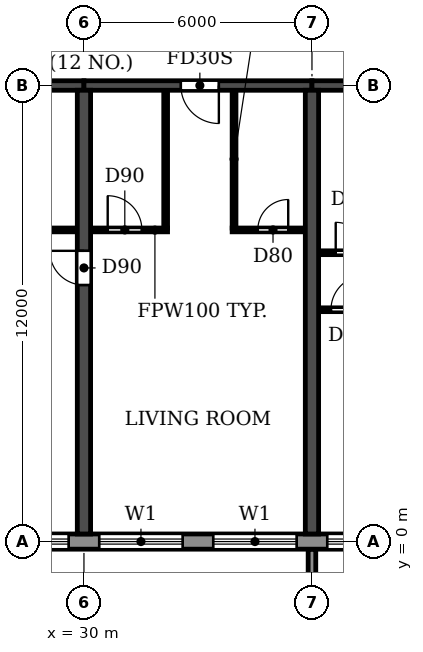
"""IFC4 building model, lengths in metres.
Left out: names, types, materials, properties, quantities, classifications, styles, units other than length and angle.
Written with IfcOpenShell. Run it as: python <this file> out.ifc"""

import sys

from ifc_helpers import new_model, si_unit, direction, frame, frame_2d, origin, place, context, subcontext, project, spatial, polyline, rectangle, outline, extrude, source, transform, mapped, element, fill, save


model = new_model("IFC4")
c1 = context("Model", 3, precision=1e-05, world=origin(), true_north=direction((0.0, 1.0)))
c2 = subcontext(c1, "Body", "Model", "MODEL_VIEW")
j1 = project(units=[si_unit("LENGTHUNIT", "METRE"), si_unit("PLANEANGLEUNIT", "RADIAN")], contexts=[c1])
p1 = place(None, origin())
s1 = spatial("IfcSite", under=j1, at=p1, CompositionType="ELEMENT")
p2 = place(p1, origin())
s2 = spatial("IfcBuilding", under=s1, at=p2, CompositionType="ELEMENT")
p3 = place(p2, frame((0.0, 0.0, 92.7)))
s3 = spatial("IfcBuildingStorey", under=s2, at=p3, CompositionType="ELEMENT", Elevation=92.7)
p4 = place(p3, frame((30.0, 0.2, 0.0), z_axis=(0.0, 0.0, 1.0), x_axis=(0.0, 1.0, 0.0)))
e1 = element("IfcWall", 1, at=p4, inside=s3, PredefinedType="SHEAR", context=c2, shape_type="SweptSolid", body=[
    extrude(rectangle(XDim=11.675, YDim=0.35, at=frame_2d((5.837, 0.0))), origin(), (0.0, 0.0, 1.0), 3.06),
])
p5 = place(p4, frame((6.55, 0.0, 0.0)))
e2 = element("IfcOpeningElement", 2, at=p5, cuts=e1, PredefinedType="OPENING", context=c2, shape_type="SweptSolid", body=[
    extrude(rectangle(XDim=0.9, YDim=2.1, at=frame_2d((0.45, 1.05))), frame((0.0, 0.185, 0.0), z_axis=(0.0, -1.0, 0.0), x_axis=(1.0, 0.0, 0.0)), (0.0, 0.0, 1.0), 0.37),
])
p6 = place(p3, frame((36.0, 0.2, 0.0), z_axis=(0.0, 0.0, 1.0), x_axis=(0.0, 1.0, 0.0)))
e3 = element("IfcWall", 3, at=p6, inside=s3, PredefinedType="SHEAR", context=c2, shape_type="SweptSolid", body=[
    extrude(rectangle(XDim=11.675, YDim=0.35, at=frame_2d((5.837, 0.0))), origin(), (0.0, 0.0, 1.0), 3.06),
])
p7 = place(p3, frame((24.0, 12.0, 0.0), z_axis=(0.0, 0.0, 1.0), x_axis=(1.0, 0.0, 0.0)))
e4 = element("IfcWall", 4, at=p7, inside=s3, PredefinedType="SHEAR", context=c2, shape_type="SweptSolid", body=[
    extrude(rectangle(XDim=6.0, YDim=0.25, at=frame_2d((3.0, 0.0))), origin(), (0.0, 0.0, 1.0), 2.46),
])
p8 = place(p3, frame((30.0, 12.0, 0.0), z_axis=(0.0, 0.0, 1.0), x_axis=(1.0, 0.0, 0.0)))
e5 = element("IfcWall", 5, at=p8, inside=s3, PredefinedType="SHEAR", context=c2, shape_type="SweptSolid", body=[
    extrude(rectangle(XDim=6.0, YDim=0.25, at=frame_2d((3.0, 0.0))), origin(), (0.0, 0.0, 1.0), 2.46),
])
p9 = place(p8, frame((2.55, 0.0, 0.0)))
e6 = element("IfcOpeningElement", 6, at=p9, cuts=e5, PredefinedType="OPENING", context=c2, shape_type="SweptSolid", body=[
    extrude(rectangle(XDim=1.0, YDim=2.1, at=frame_2d((0.5, 1.05))), frame((0.0, 0.135, 0.0), z_axis=(0.0, -1.0, 0.0), x_axis=(1.0, 0.0, 0.0)), (0.0, 0.0, 1.0), 0.27),
])
p10 = place(p3, frame((36.0, 12.0, 0.0), z_axis=(0.0, 0.0, 1.0), x_axis=(1.0, 0.0, 0.0)))
e7 = element("IfcWall", 7, at=p10, inside=s3, PredefinedType="SHEAR", context=c2, shape_type="SweptSolid", body=[
    extrude(rectangle(XDim=6.0, YDim=0.25, at=frame_2d((3.0, 0.0))), origin(), (0.0, 0.0, 1.0), 2.46),
])
p11 = place(p10, frame((2.45, 0.0, 0.0)))
e8 = element("IfcOpeningElement", 8, at=p11, cuts=e7, PredefinedType="OPENING", context=c2, shape_type="SweptSolid", body=[
    extrude(rectangle(XDim=1.0, YDim=2.1, at=frame_2d((0.5, 1.05))), frame((0.0, 0.135, 0.0), z_axis=(0.0, -1.0, 0.0), x_axis=(1.0, 0.0, 0.0)), (0.0, 0.0, 1.0), 0.27),
])
p12 = place(p3, frame((10.683, 0.0, 0.0), z_axis=(0.0, 0.0, 1.0), x_axis=(1.0, 0.0, 0.0)))
e9 = element("IfcWall", 9, at=p12, inside=s3, PredefinedType="STANDARD", context=c2, shape_type="SweptSolid", body=[
    extrude(rectangle(XDim=80.634, YDim=0.4, at=frame_2d((40.317, 0.0))), origin(), (0.0, 0.0, 1.0), 3.06),
])
p13 = place(p12, frame((1.717, 0.0, 0.9)))
e10 = element("IfcOpeningElement", 10, at=p13, cuts=e9, PredefinedType="OPENING", context=c2, shape_type="SweptSolid", body=[
    extrude(rectangle(XDim=2.2, YDim=1.5, at=frame_2d((1.1, 0.75))), frame((0.0, 0.21, 0.0), z_axis=(0.0, -1.0, 0.0), x_axis=(1.0, 0.0, 0.0)), (0.0, 0.0, 1.0), 0.42),
])
p14 = place(p12, frame((4.917, 0.0, 0.0)))
e11 = element("IfcOpeningElement", 11, at=p14, cuts=e9, PredefinedType="OPENING", context=c2, shape_type="SweptSolid", body=[
    extrude(rectangle(XDim=1.8, YDim=2.4, at=frame_2d((0.9, 1.2))), frame((0.0, 0.21, 0.0), z_axis=(0.0, -1.0, 0.0), x_axis=(1.0, 0.0, 0.0)), (0.0, 0.0, 1.0), 0.42),
])
p15 = place(p12, frame((7.717, 0.0, 0.9)))
e12 = element("IfcOpeningElement", 12, at=p15, cuts=e9, PredefinedType="OPENING", context=c2, shape_type="SweptSolid", body=[
    extrude(rectangle(XDim=2.2, YDim=1.5, at=frame_2d((1.1, 0.75))), frame((0.0, 0.21, 0.0), z_axis=(0.0, -1.0, 0.0), x_axis=(1.0, 0.0, 0.0)), (0.0, 0.0, 1.0), 0.42),
])
p16 = place(p12, frame((10.717, 0.0, 0.9)))
e13 = element("IfcOpeningElement", 13, at=p16, cuts=e9, PredefinedType="OPENING", context=c2, shape_type="SweptSolid", body=[
    extrude(rectangle(XDim=2.2, YDim=1.5, at=frame_2d((1.1, 0.75))), frame((0.0, 0.21, 0.0), z_axis=(0.0, -1.0, 0.0), x_axis=(1.0, 0.0, 0.0)), (0.0, 0.0, 1.0), 0.42),
])
p17 = place(p12, frame((13.717, 0.0, 0.9)))
e14 = element("IfcOpeningElement", 14, at=p17, cuts=e9, PredefinedType="OPENING", context=c2, shape_type="SweptSolid", body=[
    extrude(rectangle(XDim=2.2, YDim=1.5, at=frame_2d((1.1, 0.75))), frame((0.0, 0.21, 0.0), z_axis=(0.0, -1.0, 0.0), x_axis=(1.0, 0.0, 0.0)), (0.0, 0.0, 1.0), 0.42),
])
p18 = place(p12, frame((16.717, 0.0, 0.9)))
e15 = element("IfcOpeningElement", 15, at=p18, cuts=e9, PredefinedType="OPENING", context=c2, shape_type="SweptSolid", body=[
    extrude(rectangle(XDim=2.2, YDim=1.5, at=frame_2d((1.1, 0.75))), frame((0.0, 0.21, 0.0), z_axis=(0.0, -1.0, 0.0), x_axis=(1.0, 0.0, 0.0)), (0.0, 0.0, 1.0), 0.42),
])
p19 = place(p12, frame((19.717, 0.0, 0.9)))
e16 = element("IfcOpeningElement", 16, at=p19, cuts=e9, PredefinedType="OPENING", context=c2, shape_type="SweptSolid", body=[
    extrude(rectangle(XDim=2.2, YDim=1.5, at=frame_2d((1.1, 0.75))), frame((0.0, 0.21, 0.0), z_axis=(0.0, -1.0, 0.0), x_axis=(1.0, 0.0, 0.0)), (0.0, 0.0, 1.0), 0.42),
])
p20 = place(p12, frame((22.717, 0.0, 0.9)))
e17 = element("IfcOpeningElement", 17, at=p20, cuts=e9, PredefinedType="OPENING", context=c2, shape_type="SweptSolid", body=[
    extrude(rectangle(XDim=2.2, YDim=1.5, at=frame_2d((1.1, 0.75))), frame((0.0, 0.21, 0.0), z_axis=(0.0, -1.0, 0.0), x_axis=(1.0, 0.0, 0.0)), (0.0, 0.0, 1.0), 0.42),
])
p21 = place(p12, frame((25.717, 0.0, 0.9)))
e18 = element("IfcOpeningElement", 18, at=p21, cuts=e9, PredefinedType="OPENING", context=c2, shape_type="SweptSolid", body=[
    extrude(rectangle(XDim=2.2, YDim=1.5, at=frame_2d((1.1, 0.75))), frame((0.0, 0.21, 0.0), z_axis=(0.0, -1.0, 0.0), x_axis=(1.0, 0.0, 0.0)), (0.0, 0.0, 1.0), 0.42),
])
p22 = place(p12, frame((28.917, 0.0, 0.0)))
e19 = element("IfcOpeningElement", 19, at=p22, cuts=e9, PredefinedType="OPENING", context=c2, shape_type="SweptSolid", body=[
    extrude(rectangle(XDim=1.8, YDim=2.4, at=frame_2d((0.9, 1.2))), frame((0.0, 0.21, 0.0), z_axis=(0.0, -1.0, 0.0), x_axis=(1.0, 0.0, 0.0)), (0.0, 0.0, 1.0), 0.42),
])
p23 = place(p12, frame((31.717, 0.0, 0.9)))
e20 = element("IfcOpeningElement", 20, at=p23, cuts=e9, PredefinedType="OPENING", context=c2, shape_type="SweptSolid", body=[
    extrude(rectangle(XDim=2.2, YDim=1.5, at=frame_2d((1.1, 0.75))), frame((0.0, 0.21, 0.0), z_axis=(0.0, -1.0, 0.0), x_axis=(1.0, 0.0, 0.0)), (0.0, 0.0, 1.0), 0.42),
])
p24 = place(p12, frame((34.717, 0.0, 0.9)))
e21 = element("IfcOpeningElement", 21, at=p24, cuts=e9, PredefinedType="OPENING", context=c2, shape_type="SweptSolid", body=[
    extrude(rectangle(XDim=2.2, YDim=1.5, at=frame_2d((1.1, 0.75))), frame((0.0, 0.21, 0.0), z_axis=(0.0, -1.0, 0.0), x_axis=(1.0, 0.0, 0.0)), (0.0, 0.0, 1.0), 0.42),
])
p25 = place(p12, frame((37.917, 0.0, 0.0)))
e22 = element("IfcOpeningElement", 22, at=p25, cuts=e9, PredefinedType="OPENING", context=c2, shape_type="SweptSolid", body=[
    extrude(rectangle(XDim=1.8, YDim=2.4, at=frame_2d((0.9, 1.2))), frame((0.0, 0.21, 0.0), z_axis=(0.0, -1.0, 0.0), x_axis=(1.0, 0.0, 0.0)), (0.0, 0.0, 1.0), 0.42),
])
p26 = place(p12, frame((40.717, 0.0, 0.9)))
e23 = element("IfcOpeningElement", 23, at=p26, cuts=e9, PredefinedType="OPENING", context=c2, shape_type="SweptSolid", body=[
    extrude(rectangle(XDim=2.2, YDim=1.5, at=frame_2d((1.1, 0.75))), frame((0.0, 0.21, 0.0), z_axis=(0.0, -1.0, 0.0), x_axis=(1.0, 0.0, 0.0)), (0.0, 0.0, 1.0), 0.42),
])
p27 = place(p12, frame((43.717, 0.0, 0.9)))
e24 = element("IfcOpeningElement", 24, at=p27, cuts=e9, PredefinedType="OPENING", context=c2, shape_type="SweptSolid", body=[
    extrude(rectangle(XDim=2.2, YDim=1.5, at=frame_2d((1.1, 0.75))), frame((0.0, 0.21, 0.0), z_axis=(0.0, -1.0, 0.0), x_axis=(1.0, 0.0, 0.0)), (0.0, 0.0, 1.0), 0.42),
])
p28 = place(p12, frame((46.717, 0.0, 0.9)))
e25 = element("IfcOpeningElement", 25, at=p28, cuts=e9, PredefinedType="OPENING", context=c2, shape_type="SweptSolid", body=[
    extrude(rectangle(XDim=2.2, YDim=1.5, at=frame_2d((1.1, 0.75))), frame((0.0, 0.21, 0.0), z_axis=(0.0, -1.0, 0.0), x_axis=(1.0, 0.0, 0.0)), (0.0, 0.0, 1.0), 0.42),
])
p29 = place(p12, frame((49.717, 0.0, 0.9)))
e26 = element("IfcOpeningElement", 26, at=p29, cuts=e9, PredefinedType="OPENING", context=c2, shape_type="SweptSolid", body=[
    extrude(rectangle(XDim=2.2, YDim=1.5, at=frame_2d((1.1, 0.75))), frame((0.0, 0.21, 0.0), z_axis=(0.0, -1.0, 0.0), x_axis=(1.0, 0.0, 0.0)), (0.0, 0.0, 1.0), 0.42),
])
p30 = place(p12, frame((52.917, 0.0, 0.0)))
e27 = element("IfcOpeningElement", 27, at=p30, cuts=e9, PredefinedType="OPENING", context=c2, shape_type="SweptSolid", body=[
    extrude(rectangle(XDim=1.8, YDim=2.4, at=frame_2d((0.9, 1.2))), frame((0.0, 0.21, 0.0), z_axis=(0.0, -1.0, 0.0), x_axis=(1.0, 0.0, 0.0)), (0.0, 0.0, 1.0), 0.42),
])
p31 = place(p12, frame((55.717, 0.0, 0.9)))
e28 = element("IfcOpeningElement", 28, at=p31, cuts=e9, PredefinedType="OPENING", context=c2, shape_type="SweptSolid", body=[
    extrude(rectangle(XDim=2.2, YDim=1.5, at=frame_2d((1.1, 0.75))), frame((0.0, 0.21, 0.0), z_axis=(0.0, -1.0, 0.0), x_axis=(1.0, 0.0, 0.0)), (0.0, 0.0, 1.0), 0.42),
])
p32 = place(p12, frame((58.717, 0.0, 0.9)))
e29 = element("IfcOpeningElement", 29, at=p32, cuts=e9, PredefinedType="OPENING", context=c2, shape_type="SweptSolid", body=[
    extrude(rectangle(XDim=2.2, YDim=1.5, at=frame_2d((1.1, 0.75))), frame((0.0, 0.21, 0.0), z_axis=(0.0, -1.0, 0.0), x_axis=(1.0, 0.0, 0.0)), (0.0, 0.0, 1.0), 0.42),
])
p33 = place(p12, frame((61.717, 0.0, 0.9)))
e30 = element("IfcOpeningElement", 30, at=p33, cuts=e9, PredefinedType="OPENING", context=c2, shape_type="SweptSolid", body=[
    extrude(rectangle(XDim=2.2, YDim=1.5, at=frame_2d((1.1, 0.75))), frame((0.0, 0.21, 0.0), z_axis=(0.0, -1.0, 0.0), x_axis=(1.0, 0.0, 0.0)), (0.0, 0.0, 1.0), 0.42),
])
p34 = place(p12, frame((64.917, 0.0, 0.0)))
e31 = element("IfcOpeningElement", 31, at=p34, cuts=e9, PredefinedType="OPENING", context=c2, shape_type="SweptSolid", body=[
    extrude(rectangle(XDim=1.8, YDim=2.4, at=frame_2d((0.9, 1.2))), frame((0.0, 0.21, 0.0), z_axis=(0.0, -1.0, 0.0), x_axis=(1.0, 0.0, 0.0)), (0.0, 0.0, 1.0), 0.42),
])
p35 = place(p12, frame((67.717, 0.0, 0.9)))
e32 = element("IfcOpeningElement", 32, at=p35, cuts=e9, PredefinedType="OPENING", context=c2, shape_type="SweptSolid", body=[
    extrude(rectangle(XDim=2.2, YDim=1.5, at=frame_2d((1.1, 0.75))), frame((0.0, 0.21, 0.0), z_axis=(0.0, -1.0, 0.0), x_axis=(1.0, 0.0, 0.0)), (0.0, 0.0, 1.0), 0.42),
])
p36 = place(p12, frame((70.717, 0.0, 0.9)))
e33 = element("IfcOpeningElement", 33, at=p36, cuts=e9, PredefinedType="OPENING", context=c2, shape_type="SweptSolid", body=[
    extrude(rectangle(XDim=2.2, YDim=1.5, at=frame_2d((1.1, 0.75))), frame((0.0, 0.21, 0.0), z_axis=(0.0, -1.0, 0.0), x_axis=(1.0, 0.0, 0.0)), (0.0, 0.0, 1.0), 0.42),
])
p37 = place(p12, frame((73.917, 0.0, 0.0)))
e34 = element("IfcOpeningElement", 34, at=p37, cuts=e9, PredefinedType="OPENING", context=c2, shape_type="SweptSolid", body=[
    extrude(rectangle(XDim=1.8, YDim=2.4, at=frame_2d((0.9, 1.2))), frame((0.0, 0.21, 0.0), z_axis=(0.0, -1.0, 0.0), x_axis=(1.0, 0.0, 0.0)), (0.0, 0.0, 1.0), 0.42),
])
p38 = place(p12, frame((76.717, 0.0, 0.9)))
e35 = element("IfcOpeningElement", 35, at=p38, cuts=e9, PredefinedType="OPENING", context=c2, shape_type="SweptSolid", body=[
    extrude(rectangle(XDim=2.2, YDim=1.5, at=frame_2d((1.1, 0.75))), frame((0.0, 0.21, 0.0), z_axis=(0.0, -1.0, 0.0), x_axis=(1.0, 0.0, 0.0)), (0.0, 0.0, 1.0), 0.42),
])
m1 = source(origin(), c2, "Body", "SweptSolid", [
    extrude(outline(polyline([(0.0, 0.0), (0.2, 0.0), (0.2, 1.65), (0.0, 1.65), (0.0, 0.0)])), origin(), (0.0, 0.0, 1.0), 3.1),
])
p39 = place(p3, frame((35.9, -1.85, 0.0)))
e36 = element("IfcWall", 36, at=p39, inside=s3, PredefinedType="STANDARD", context=c2, shape_type="MappedRepresentation", body=[
    mapped(m1, transform((0.0, 0.0, 0.0))),
])
p40 = place(p3, frame((36.185, 6.1, 0.0), z_axis=(0.0, 0.0, 1.0), x_axis=(1.0, 0.0, 0.0)))
e37 = element("IfcWall", 37, at=p40, inside=s3, PredefinedType="PARTITIONING", context=c2, shape_type="SweptSolid", body=[
    extrude(rectangle(XDim=2.865, YDim=0.1, at=frame_2d((1.433, 0.0))), origin(), (0.0, 0.0, 1.0), 3.06),
])
p41 = place(p40, frame((0.315, 0.0, 0.0)))
e38 = element("IfcOpeningElement", 38, at=p41, cuts=e37, PredefinedType="OPENING", context=c2, shape_type="SweptSolid", body=[
    extrude(rectangle(XDim=0.9, YDim=2.1, at=frame_2d((0.45, 1.05))), frame((0.0, 0.06, 0.0), z_axis=(0.0, -1.0, 0.0), x_axis=(1.0, 0.0, 0.0)), (0.0, 0.0, 1.0), 0.12),
])
p42 = place(p3, frame((36.185, 7.6, 0.0), z_axis=(0.0, 0.0, 1.0), x_axis=(1.0, 0.0, 0.0)))
e39 = element("IfcWall", 39, at=p42, inside=s3, PredefinedType="PARTITIONING", context=c2, shape_type="SweptSolid", body=[
    extrude(rectangle(XDim=1.915, YDim=0.1, at=frame_2d((0.958, 0.0))), origin(), (0.0, 0.0, 1.0), 3.06),
])
p43 = place(p42, frame((0.44, 0.0, 0.0)))
e40 = element("IfcOpeningElement", 40, at=p43, cuts=e39, PredefinedType="OPENING", context=c2, shape_type="SweptSolid", body=[
    extrude(rectangle(XDim=0.8, YDim=2.1, at=frame_2d((0.4, 1.05))), frame((0.0, 0.06, 0.0), z_axis=(0.0, -1.0, 0.0), x_axis=(1.0, 0.0, 0.0)), (0.0, 0.0, 1.0), 0.12),
])
p44 = place(p3, frame((27.1, 8.2, 0.0), z_axis=(0.0, 0.0, 1.0), x_axis=(1.0, 0.0, 0.0)))
e41 = element("IfcWall", 41, at=p44, inside=s3, PredefinedType="PARTITIONING", context=c2, shape_type="SweptSolid", body=[
    extrude(rectangle(XDim=2.715, YDim=0.1, at=frame_2d((1.357, 0.0))), origin(), (0.0, 0.0, 1.0), 3.06),
])
p45 = place(p44, frame((1.0, 0.0, 0.0)))
e42 = element("IfcOpeningElement", 42, at=p45, cuts=e41, PredefinedType="OPENING", context=c2, shape_type="SweptSolid", body=[
    extrude(rectangle(XDim=0.8, YDim=2.1, at=frame_2d((0.4, 1.05))), frame((0.0, 0.06, 0.0), z_axis=(0.0, -1.0, 0.0), x_axis=(1.0, 0.0, 0.0)), (0.0, 0.0, 1.0), 0.12),
])
p46 = place(p3, frame((30.185, 8.2, 0.0), z_axis=(0.0, 0.0, 1.0), x_axis=(1.0, 0.0, 0.0)))
e43 = element("IfcWall", 43, at=p46, inside=s3, PredefinedType="PARTITIONING", context=c2, shape_type="SweptSolid", body=[
    extrude(rectangle(XDim=2.015, YDim=0.1, at=frame_2d((1.007, 0.0))), origin(), (0.0, 0.0, 1.0), 3.06),
])
p47 = place(p46, frame((0.44, 0.0, 0.0)))
e44 = element("IfcOpeningElement", 44, at=p47, cuts=e43, PredefinedType="OPENING", context=c2, shape_type="SweptSolid", body=[
    extrude(rectangle(XDim=0.9, YDim=2.1, at=frame_2d((0.45, 1.05))), frame((0.0, 0.06, 0.0), z_axis=(0.0, -1.0, 0.0), x_axis=(1.0, 0.0, 0.0)), (0.0, 0.0, 1.0), 0.12),
])
p48 = place(p3, frame((33.9, 8.2, 0.0), z_axis=(0.0, 0.0, 1.0), x_axis=(1.0, 0.0, 0.0)))
e45 = element("IfcWall", 45, at=p48, inside=s3, PredefinedType="PARTITIONING", context=c2, shape_type="SweptSolid", body=[
    extrude(rectangle(XDim=1.915, YDim=0.1, at=frame_2d((0.958, 0.0))), origin(), (0.0, 0.0, 1.0), 3.06),
])
p49 = place(p48, frame((0.675, 0.0, 0.0)))
e46 = element("IfcOpeningElement", 46, at=p49, cuts=e45, PredefinedType="OPENING", context=c2, shape_type="SweptSolid", body=[
    extrude(rectangle(XDim=0.8, YDim=2.1, at=frame_2d((0.4, 1.05))), frame((0.0, 0.06, 0.0), z_axis=(0.0, -1.0, 0.0), x_axis=(1.0, 0.0, 0.0)), (0.0, 0.0, 1.0), 0.12),
])
for number, where, z_axis, x_axis in (
    (47, (32.15, 8.25, 0.0), (0.0, 0.0, 1.0), (0.0, 1.0, 0.0)),
    (48, (33.95, 8.25, 0.0), (0.0, 0.0, 1.0), (0.0, 1.0, 0.0)),
):
    element("IfcWall", number, at=place(p3, frame(where, z_axis=z_axis, x_axis=x_axis)), inside=s3, PredefinedType="PARTITIONING", context=c2, shape_type="SweptSolid", body=[
        extrude(rectangle(XDim=3.615, YDim=0.1, at=frame_2d((1.808, 0.0))), origin(), (0.0, 0.0, 1.0), 3.06),
    ])
p50 = place(p18, origin())
e49 = element("IfcWindow", 49, at=p50, inside=s3, PartitioningType="DOUBLE_PANEL_HORIZONTAL", PredefinedType="WINDOW", context=c2, shape_type="SweptSolid", body=[
    extrude(rectangle(XDim=2.2, YDim=1.5, at=frame_2d((1.1, 0.75))), frame((0.0, 0.03, 0.0), z_axis=(0.0, -1.0, 0.0), x_axis=(1.0, 0.0, 0.0)), (0.0, 0.0, 1.0), 0.06),
])
fill(e15, e49)
p51 = place(p19, origin())
e50 = element("IfcWindow", 50, at=p51, inside=s3, PartitioningType="DOUBLE_PANEL_HORIZONTAL", PredefinedType="WINDOW", context=c2, shape_type="SweptSolid", body=[
    extrude(rectangle(XDim=2.2, YDim=1.5, at=frame_2d((1.1, 0.75))), frame((0.0, 0.03, 0.0), z_axis=(0.0, -1.0, 0.0), x_axis=(1.0, 0.0, 0.0)), (0.0, 0.0, 1.0), 0.06),
])
fill(e16, e50)
p52 = place(p20, origin())
e51 = element("IfcWindow", 51, at=p52, inside=s3, PartitioningType="DOUBLE_PANEL_HORIZONTAL", PredefinedType="WINDOW", context=c2, shape_type="SweptSolid", body=[
    extrude(rectangle(XDim=2.2, YDim=1.5, at=frame_2d((1.1, 0.75))), frame((0.0, 0.03, 0.0), z_axis=(0.0, -1.0, 0.0), x_axis=(1.0, 0.0, 0.0)), (0.0, 0.0, 1.0), 0.06),
])
fill(e17, e51)
p53 = place(p21, origin())
e52 = element("IfcWindow", 52, at=p53, inside=s3, PartitioningType="DOUBLE_PANEL_HORIZONTAL", PredefinedType="WINDOW", context=c2, shape_type="SweptSolid", body=[
    extrude(rectangle(XDim=2.2, YDim=1.5, at=frame_2d((1.1, 0.75))), frame((0.0, 0.03, 0.0), z_axis=(0.0, -1.0, 0.0), x_axis=(1.0, 0.0, 0.0)), (0.0, 0.0, 1.0), 0.06),
])
fill(e18, e52)
p54 = place(p5, origin())
e53 = element("IfcDoor", 53, at=p54, inside=s3, OperationType="SINGLE_SWING_RIGHT", PredefinedType="DOOR", context=c2, shape_type="SweptSolid", body=[
    extrude(rectangle(XDim=0.9, YDim=2.1, at=frame_2d((0.45, 1.05))), frame((0.0, 0.025, 0.0), z_axis=(0.0, -1.0, 0.0), x_axis=(1.0, 0.0, 0.0)), (0.0, 0.0, 1.0), 0.05),
])
fill(e2, e53)
p55 = place(p47, origin())
e54 = element("IfcDoor", 54, at=p55, inside=s3, OperationType="SINGLE_SWING_LEFT", PredefinedType="DOOR", context=c2, shape_type="SweptSolid", body=[
    extrude(rectangle(XDim=0.9, YDim=2.1, at=frame_2d((0.45, 1.05))), frame((0.0, 0.025, 0.0), z_axis=(0.0, -1.0, 0.0), x_axis=(1.0, 0.0, 0.0)), (0.0, 0.0, 1.0), 0.05),
])
fill(e44, e54)
p56 = place(p9, frame((1.0, 0.0, 0.0), z_axis=(0.0, 0.0, 1.0), x_axis=(-1.0, 0.0, 0.0)))
e55 = element("IfcDoor", 55, at=p56, inside=s3, OperationType="SINGLE_SWING_LEFT", PredefinedType="DOOR", context=c2, shape_type="SweptSolid", body=[
    extrude(rectangle(XDim=1.0, YDim=2.1, at=frame_2d((0.5, 1.05))), frame((0.0, 0.025, 0.0), z_axis=(0.0, -1.0, 0.0), x_axis=(1.0, 0.0, 0.0)), (0.0, 0.0, 1.0), 0.05),
])
fill(e6, e55)
p57 = place(p49, origin())
e56 = element("IfcDoor", 56, at=p57, inside=s3, OperationType="SINGLE_SWING_RIGHT", PredefinedType="DOOR", context=c2, shape_type="SweptSolid", body=[
    extrude(rectangle(XDim=0.8, YDim=2.1, at=frame_2d((0.4, 1.05))), frame((0.0, 0.025, 0.0), z_axis=(0.0, -1.0, 0.0), x_axis=(1.0, 0.0, 0.0)), (0.0, 0.0, 1.0), 0.05),
])
fill(e46, e56)
p58 = place(p41, origin())
e57 = element("IfcDoor", 57, at=p58, inside=s3, OperationType="SINGLE_SWING_RIGHT", PredefinedType="DOOR", context=c2, shape_type="SweptSolid", body=[
    extrude(rectangle(XDim=0.9, YDim=2.1, at=frame_2d((0.45, 1.05))), frame((0.0, 0.025, 0.0), z_axis=(0.0, -1.0, 0.0), x_axis=(1.0, 0.0, 0.0)), (0.0, 0.0, 1.0), 0.05),
])
fill(e38, e57)
p59 = place(p43, origin())
e58 = element("IfcDoor", 58, at=p59, inside=s3, OperationType="SINGLE_SWING_LEFT", PredefinedType="DOOR", context=c2, shape_type="SweptSolid", body=[
    extrude(rectangle(XDim=0.8, YDim=2.1, at=frame_2d((0.4, 1.05))), frame((0.0, 0.025, 0.0), z_axis=(0.0, -1.0, 0.0), x_axis=(1.0, 0.0, 0.0)), (0.0, 0.0, 1.0), 0.05),
])
fill(e40, e58)
save(model, sys.argv[1])
